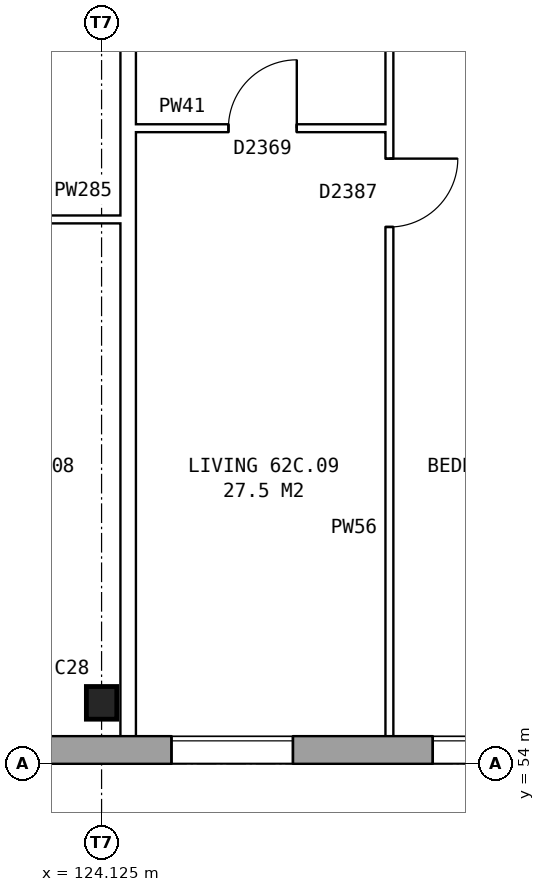
"""IFC4 building model, lengths in metres.
Left out: names, types, materials, properties, quantities, classifications, styles, units other than length and angle.
Written with IfcOpenShell. Run it as: python <this file> out.ifc"""

import sys

from ifc_helpers import new_model, si_unit, direction, frame, frame_2d, origin, origin_2d, place, context, subcontext, project, spatial, rectangle, i_section, extrude, element, fill, save


model = new_model("IFC4")
c1 = context("Model", 3, precision=1e-05, world=origin(), true_north=direction((0.0, 1.0)))
c2 = subcontext(c1, "Body", "Model", "MODEL_VIEW")
j1 = project(units=[si_unit("LENGTHUNIT", "METRE"), si_unit("PLANEANGLEUNIT", "RADIAN")], contexts=[c1])
p1 = place(None, origin())
s1 = spatial("IfcSite", under=j1, at=p1, CompositionType="ELEMENT")
p2 = place(p1, origin())
s2 = spatial("IfcBuilding", under=s1, at=p2, CompositionType="ELEMENT")
p3 = place(p2, frame((0.0, 0.0, 221.4)))
s3 = spatial("IfcBuildingStorey", under=s2, at=p3, CompositionType="ELEMENT", Elevation=221.4)
p4 = place(p3, frame((124.125, 54.8, 0.0), z_axis=(0.0, 0.0, 1.0), x_axis=(1.0, 0.0, 0.0)))
e1 = element("IfcColumn", 1, at=p4, inside=s3, PredefinedType="COLUMN", context=c2, shape_type="SweptSolid", body=[
    extrude(i_section(OverallWidth=0.4, OverallDepth=0.43, WebThickness=0.04, FlangeThickness=0.04, at=origin_2d()), origin(), (0.0, 0.0, 1.0), 2.85),
])
p5 = place(p3, frame((75.95, 54.18, 0.0), z_axis=(0.0, 0.0, 1.0), x_axis=(1.0, 0.0, 0.0)))
e2 = element("IfcWall", 2, at=p5, inside=s3, PredefinedType="STANDARD", context=c2, shape_type="SweptSolid", body=[
    extrude(rectangle(XDim=55.1, YDim=0.36, at=frame_2d((27.55, 0.0))), origin(), (0.0, 0.0, 1.0), 2.85),
])
p6 = place(p5, frame((0.969, 0.0, 0.8)))
e3 = element("IfcOpeningElement", 3, at=p6, cuts=e2, PredefinedType="OPENING", context=c2, shape_type="SweptSolid", body=[
    extrude(rectangle(XDim=1.6, YDim=1.8, at=frame_2d((0.8, 0.9))), frame((0.0, 0.19, 0.0), z_axis=(0.0, -1.0, 0.0), x_axis=(1.0, 0.0, 0.0)), (0.0, 0.0, 1.0), 0.38),
])
p7 = place(p5, frame((4.406, 0.0, 0.8)))
e4 = element("IfcOpeningElement", 4, at=p7, cuts=e2, PredefinedType="OPENING", context=c2, shape_type="SweptSolid", body=[
    extrude(rectangle(XDim=1.6, YDim=1.8, at=frame_2d((0.8, 0.9))), frame((0.0, 0.19, 0.0), z_axis=(0.0, -1.0, 0.0), x_axis=(1.0, 0.0, 0.0)), (0.0, 0.0, 1.0), 0.38),
])
p8 = place(p5, frame((7.844, 0.0, 0.8)))
e5 = element("IfcOpeningElement", 5, at=p8, cuts=e2, PredefinedType="OPENING", context=c2, shape_type="SweptSolid", body=[
    extrude(rectangle(XDim=1.6, YDim=1.8, at=frame_2d((0.8, 0.9))), frame((0.0, 0.19, 0.0), z_axis=(0.0, -1.0, 0.0), x_axis=(1.0, 0.0, 0.0)), (0.0, 0.0, 1.0), 0.38),
])
p9 = place(p5, frame((11.281, 0.0, 0.8)))
e6 = element("IfcOpeningElement", 6, at=p9, cuts=e2, PredefinedType="OPENING", context=c2, shape_type="SweptSolid", body=[
    extrude(rectangle(XDim=1.6, YDim=1.8, at=frame_2d((0.8, 0.9))), frame((0.0, 0.19, 0.0), z_axis=(0.0, -1.0, 0.0), x_axis=(1.0, 0.0, 0.0)), (0.0, 0.0, 1.0), 0.38),
])
p10 = place(p5, frame((14.719, 0.0, 0.8)))
e7 = element("IfcOpeningElement", 7, at=p10, cuts=e2, PredefinedType="OPENING", context=c2, shape_type="SweptSolid", body=[
    extrude(rectangle(XDim=1.6, YDim=1.8, at=frame_2d((0.8, 0.9))), frame((0.0, 0.19, 0.0), z_axis=(0.0, -1.0, 0.0), x_axis=(1.0, 0.0, 0.0)), (0.0, 0.0, 1.0), 0.38),
])
p11 = place(p5, frame((18.156, 0.0, 0.8)))
e8 = element("IfcOpeningElement", 8, at=p11, cuts=e2, PredefinedType="OPENING", context=c2, shape_type="SweptSolid", body=[
    extrude(rectangle(XDim=1.6, YDim=1.8, at=frame_2d((0.8, 0.9))), frame((0.0, 0.19, 0.0), z_axis=(0.0, -1.0, 0.0), x_axis=(1.0, 0.0, 0.0)), (0.0, 0.0, 1.0), 0.38),
])
p12 = place(p5, frame((21.594, 0.0, 0.8)))
e9 = element("IfcOpeningElement", 9, at=p12, cuts=e2, PredefinedType="OPENING", context=c2, shape_type="SweptSolid", body=[
    extrude(rectangle(XDim=1.6, YDim=1.8, at=frame_2d((0.8, 0.9))), frame((0.0, 0.19, 0.0), z_axis=(0.0, -1.0, 0.0), x_axis=(1.0, 0.0, 0.0)), (0.0, 0.0, 1.0), 0.38),
])
p13 = place(p5, frame((25.031, 0.0, 0.8)))
e10 = element("IfcOpeningElement", 10, at=p13, cuts=e2, PredefinedType="OPENING", context=c2, shape_type="SweptSolid", body=[
    extrude(rectangle(XDim=1.6, YDim=1.8, at=frame_2d((0.8, 0.9))), frame((0.0, 0.19, 0.0), z_axis=(0.0, -1.0, 0.0), x_axis=(1.0, 0.0, 0.0)), (0.0, 0.0, 1.0), 0.38),
])
p14 = place(p5, frame((28.469, 0.0, 0.8)))
e11 = element("IfcOpeningElement", 11, at=p14, cuts=e2, PredefinedType="OPENING", context=c2, shape_type="SweptSolid", body=[
    extrude(rectangle(XDim=1.6, YDim=1.8, at=frame_2d((0.8, 0.9))), frame((0.0, 0.19, 0.0), z_axis=(0.0, -1.0, 0.0), x_axis=(1.0, 0.0, 0.0)), (0.0, 0.0, 1.0), 0.38),
])
p15 = place(p5, frame((31.906, 0.0, 0.8)))
e12 = element("IfcOpeningElement", 12, at=p15, cuts=e2, PredefinedType="OPENING", context=c2, shape_type="SweptSolid", body=[
    extrude(rectangle(XDim=1.6, YDim=1.8, at=frame_2d((0.8, 0.9))), frame((0.0, 0.19, 0.0), z_axis=(0.0, -1.0, 0.0), x_axis=(1.0, 0.0, 0.0)), (0.0, 0.0, 1.0), 0.38),
])
p16 = place(p5, frame((35.344, 0.0, 0.8)))
e13 = element("IfcOpeningElement", 13, at=p16, cuts=e2, PredefinedType="OPENING", context=c2, shape_type="SweptSolid", body=[
    extrude(rectangle(XDim=1.6, YDim=1.8, at=frame_2d((0.8, 0.9))), frame((0.0, 0.19, 0.0), z_axis=(0.0, -1.0, 0.0), x_axis=(1.0, 0.0, 0.0)), (0.0, 0.0, 1.0), 0.38),
])
p17 = place(p5, frame((38.781, 0.0, 0.8)))
e14 = element("IfcOpeningElement", 14, at=p17, cuts=e2, PredefinedType="OPENING", context=c2, shape_type="SweptSolid", body=[
    extrude(rectangle(XDim=1.6, YDim=1.8, at=frame_2d((0.8, 0.9))), frame((0.0, 0.19, 0.0), z_axis=(0.0, -1.0, 0.0), x_axis=(1.0, 0.0, 0.0)), (0.0, 0.0, 1.0), 0.38),
])
p18 = place(p5, frame((42.219, 0.0, 0.8)))
e15 = element("IfcOpeningElement", 15, at=p18, cuts=e2, PredefinedType="OPENING", context=c2, shape_type="SweptSolid", body=[
    extrude(rectangle(XDim=1.6, YDim=1.8, at=frame_2d((0.8, 0.9))), frame((0.0, 0.19, 0.0), z_axis=(0.0, -1.0, 0.0), x_axis=(1.0, 0.0, 0.0)), (0.0, 0.0, 1.0), 0.38),
])
p19 = place(p5, frame((45.656, 0.0, 0.8)))
e16 = element("IfcOpeningElement", 16, at=p19, cuts=e2, PredefinedType="OPENING", context=c2, shape_type="SweptSolid", body=[
    extrude(rectangle(XDim=1.6, YDim=1.8, at=frame_2d((0.8, 0.9))), frame((0.0, 0.19, 0.0), z_axis=(0.0, -1.0, 0.0), x_axis=(1.0, 0.0, 0.0)), (0.0, 0.0, 1.0), 0.38),
])
p20 = place(p5, frame((49.094, 0.0, 0.8)))
e17 = element("IfcOpeningElement", 17, at=p20, cuts=e2, PredefinedType="OPENING", context=c2, shape_type="SweptSolid", body=[
    extrude(rectangle(XDim=1.6, YDim=1.8, at=frame_2d((0.8, 0.9))), frame((0.0, 0.19, 0.0), z_axis=(0.0, -1.0, 0.0), x_axis=(1.0, 0.0, 0.0)), (0.0, 0.0, 1.0), 0.38),
])
p21 = place(p5, frame((52.531, 0.0, 0.8)))
e18 = element("IfcOpeningElement", 18, at=p21, cuts=e2, PredefinedType="OPENING", context=c2, shape_type="SweptSolid", body=[
    extrude(rectangle(XDim=1.6, YDim=1.8, at=frame_2d((0.8, 0.9))), frame((0.0, 0.19, 0.0), z_axis=(0.0, -1.0, 0.0), x_axis=(1.0, 0.0, 0.0)), (0.0, 0.0, 1.0), 0.38),
])
p22 = place(p3, frame((121.037, 61.16, 0.0), z_axis=(0.0, 0.0, 1.0), x_axis=(1.0, 0.0, 0.0)))
e19 = element("IfcWall", 19, at=p22, inside=s3, PredefinedType="PARTITIONING", context=c2, shape_type="SweptSolid", body=[
    extrude(rectangle(XDim=3.338, YDim=0.1, at=frame_2d((1.669, 0.0))), origin(), (0.0, 0.0, 1.0), 2.85),
])
p23 = place(p22, frame((1.219, 0.0, 0.0)))
e20 = element("IfcOpeningElement", 20, at=p23, cuts=e19, PredefinedType="OPENING", context=c2, shape_type="SweptSolid", body=[
    extrude(rectangle(XDim=0.9, YDim=2.1, at=frame_2d((0.45, 1.05))), frame((0.0, 0.06, 0.0), z_axis=(0.0, -1.0, 0.0), x_axis=(1.0, 0.0, 0.0)), (0.0, 0.0, 1.0), 0.12),
])
p24 = place(p3, frame((124.575, 62.36, 0.0), z_axis=(0.0, 0.0, 1.0), x_axis=(1.0, 0.0, 0.0)))
e21 = element("IfcWall", 21, at=p24, inside=s3, PredefinedType="PARTITIONING", context=c2, shape_type="SweptSolid", body=[
    extrude(rectangle(XDim=3.337, YDim=0.1, at=frame_2d((1.668, 0.0))), origin(), (0.0, 0.0, 1.0), 2.85),
])
p25 = place(p24, frame((1.219, 0.0, 0.0)))
e22 = element("IfcOpeningElement", 22, at=p25, cuts=e21, PredefinedType="OPENING", context=c2, shape_type="SweptSolid", body=[
    extrude(rectangle(XDim=0.9, YDim=2.1, at=frame_2d((0.45, 1.05))), frame((0.0, 0.06, 0.0), z_axis=(0.0, -1.0, 0.0), x_axis=(1.0, 0.0, 0.0)), (0.0, 0.0, 1.0), 0.12),
])
p26 = place(p3, frame((124.475, 54.36, 0.0), z_axis=(0.0, 0.0, 1.0), x_axis=(0.0, 1.0, 0.0)))
e23 = element("IfcWall", 23, at=p26, inside=s3, PredefinedType="PARTITIONING", context=c2, shape_type="SweptSolid", body=[
    extrude(rectangle(XDim=14.34, YDim=0.2, at=frame_2d((7.17, 0.0))), origin(), (0.0, 0.0, 1.0), 2.85),
])
p27 = place(p3, frame((127.912, 54.36, 0.0), z_axis=(0.0, 0.0, 1.0), x_axis=(0.0, 1.0, 0.0)))
e24 = element("IfcWall", 24, at=p27, inside=s3, PredefinedType="PARTITIONING", context=c2, shape_type="SweptSolid", body=[
    extrude(rectangle(XDim=14.34, YDim=0.1, at=frame_2d((7.17, 0.0))), origin(), (0.0, 0.0, 1.0), 2.85),
])
p28 = place(p27, frame((6.7, 0.0, 0.0)))
e25 = element("IfcOpeningElement", 25, at=p28, cuts=e24, PredefinedType="OPENING", context=c2, shape_type="SweptSolid", body=[
    extrude(rectangle(XDim=0.9, YDim=2.1, at=frame_2d((0.45, 1.05))), frame((0.0, 0.06, 0.0), z_axis=(0.0, -1.0, 0.0), x_axis=(1.0, 0.0, 0.0)), (0.0, 0.0, 1.0), 0.12),
])
p29 = place(p27, frame((13.04, 0.0, 0.0)))
e26 = element("IfcOpeningElement", 26, at=p29, cuts=e24, PredefinedType="OPENING", context=c2, shape_type="SweptSolid", body=[
    extrude(rectangle(XDim=0.9, YDim=2.1, at=frame_2d((0.45, 1.05))), frame((0.0, 0.06, 0.0), z_axis=(0.0, -1.0, 0.0), x_axis=(1.0, 0.0, 0.0)), (0.0, 0.0, 1.0), 0.12),
])
p30 = place(p20, origin())
e27 = element("IfcWindow", 27, at=p30, inside=s3, PartitioningType="SINGLE_PANEL", PredefinedType="WINDOW", context=c2, shape_type="SweptSolid", body=[
    extrude(rectangle(XDim=1.6, YDim=1.8, at=frame_2d((0.8, 0.9))), frame((0.0, 0.15, 0.0), z_axis=(0.0, -1.0, 0.0), x_axis=(1.0, 0.0, 0.0)), (0.0, 0.0, 1.0), 0.06),
])
fill(e17, e27)
p31 = place(p21, origin())
e28 = element("IfcWindow", 28, at=p31, inside=s3, PartitioningType="SINGLE_PANEL", PredefinedType="WINDOW", context=c2, shape_type="SweptSolid", body=[
    extrude(rectangle(XDim=1.6, YDim=1.8, at=frame_2d((0.8, 0.9))), frame((0.0, 0.15, 0.0), z_axis=(0.0, -1.0, 0.0), x_axis=(1.0, 0.0, 0.0)), (0.0, 0.0, 1.0), 0.06),
])
fill(e18, e28)
p32 = place(p28, frame((0.9, 0.0, 0.0), z_axis=(0.0, 0.0, 1.0), x_axis=(-1.0, 0.0, 0.0)))
e29 = element("IfcDoor", 29, at=p32, inside=s3, OperationType="SINGLE_SWING_LEFT", PredefinedType="DOOR", context=c2, shape_type="SweptSolid", body=[
    extrude(rectangle(XDim=0.9, YDim=2.1, at=frame_2d((0.45, 1.05))), frame((0.0, 0.025, 0.0), z_axis=(0.0, -1.0, 0.0), x_axis=(1.0, 0.0, 0.0)), (0.0, 0.0, 1.0), 0.05),
])
fill(e25, e29)
p33 = place(p25, origin())
e30 = element("IfcDoor", 30, at=p33, inside=s3, OperationType="SINGLE_SWING_RIGHT", PredefinedType="DOOR", context=c2, shape_type="SweptSolid", body=[
    extrude(rectangle(XDim=0.9, YDim=2.1, at=frame_2d((0.45, 1.05))), frame((0.0, 0.025, 0.0), z_axis=(0.0, -1.0, 0.0), x_axis=(1.0, 0.0, 0.0)), (0.0, 0.0, 1.0), 0.05),
])
fill(e22, e30)
save(model, sys.argv[1])
